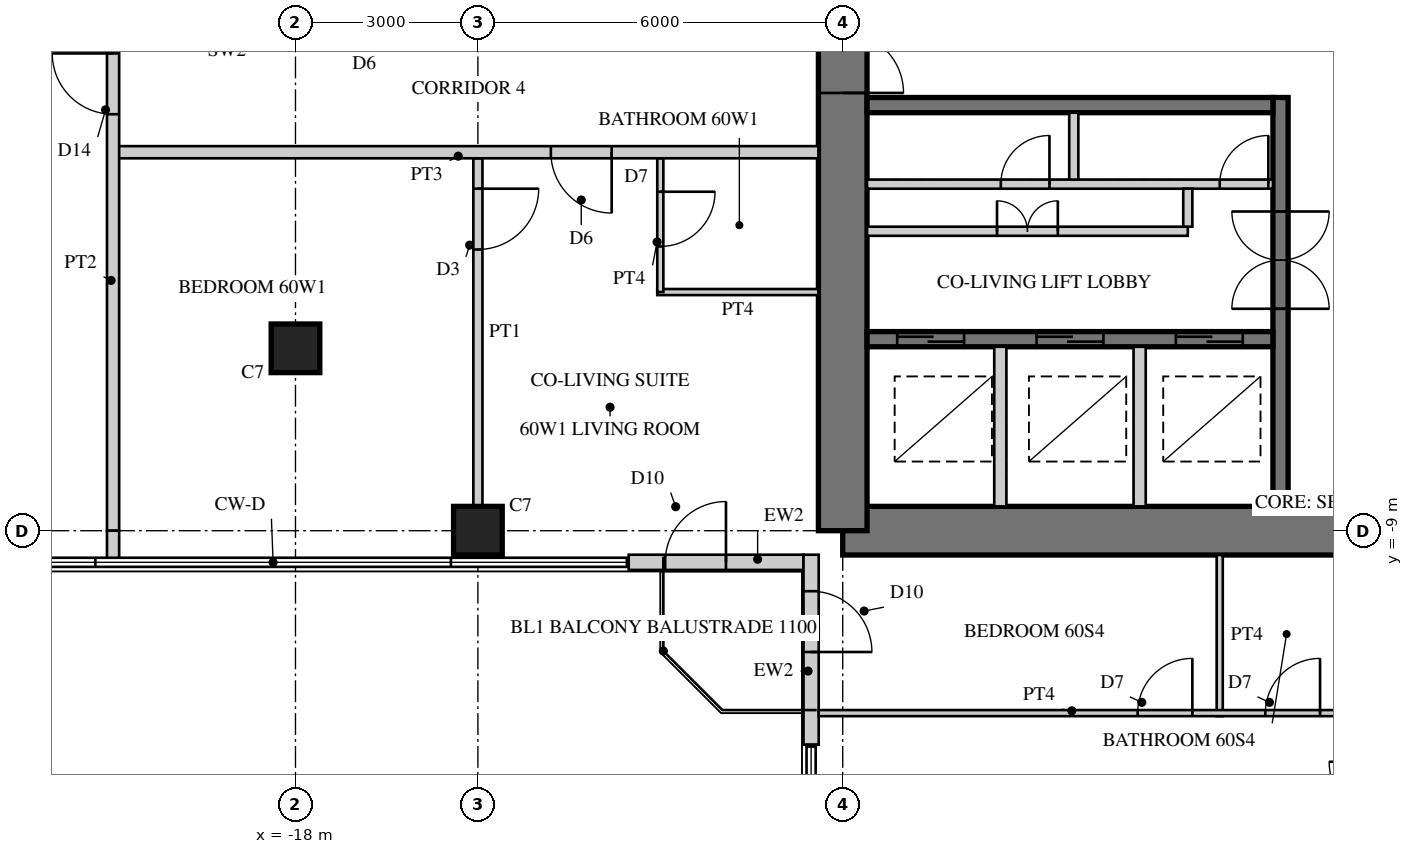
"""IFC4 building model, lengths in metres.
Left out: names, types, materials, properties, quantities, classifications, styles, units other than length and angle.
Written with IfcOpenShell. Run it as: python <this file> out.ifc"""

import sys

from ifc_helpers import new_model, si_unit, direction, frame, frame_2d, origin, origin_2d, place, context, subcontext, project, spatial, rectangle, hollow_rectangle, extrude, element, fill, save


model = new_model("IFC4")
c1 = context("Model", 3, precision=1e-05, world=origin(), true_north=direction((0.0, 1.0)))
c2 = subcontext(c1, "Body", "Model", "MODEL_VIEW")
j1 = project(units=[si_unit("LENGTHUNIT", "METRE"), si_unit("PLANEANGLEUNIT", "RADIAN")], contexts=[c1])
p1 = place(None, origin())
s1 = spatial("IfcSite", under=j1, at=p1, CompositionType="ELEMENT")
p2 = place(p1, origin())
s2 = spatial("IfcBuilding", under=s1, at=p2, CompositionType="ELEMENT")
p3 = place(p2, frame((0.0, 0.0, 235.7)))
s3 = spatial("IfcBuildingStorey", under=s2, at=p3, CompositionType="ELEMENT", Elevation=235.7)
p4 = place(p3, frame((-9.0, -9.0, 0.0), z_axis=(0.0, 0.0, 1.0), x_axis=(1.0, 0.0, 0.0)))
e1 = element("IfcWall", 1, at=p4, inside=s3, PredefinedType="SHEAR", context=c2, shape_type="SweptSolid", body=[
    extrude(rectangle(XDim=18.0, YDim=0.8, at=frame_2d((9.0, 0.0))), origin(), (0.0, 0.0, 1.0), 3.4),
])
p5 = place(p4, frame((9.8, 0.0, 0.0)))
e2 = element("IfcOpeningElement", 2, at=p5, cuts=e1, PredefinedType="OPENING", context=c2, shape_type="SweptSolid", body=[
    extrude(rectangle(XDim=1.0, YDim=2.4, at=frame_2d((0.5, 1.2))), frame((0.0, 0.41, 0.0), z_axis=(0.0, -1.0, 0.0), x_axis=(1.0, 0.0, 0.0)), (0.0, 0.0, 1.0), 0.82),
])
p6 = place(p3, frame((-9.0, 9.0, 0.0), z_axis=(0.0, 0.0, 1.0), x_axis=(0.0, -1.0, 0.0)))
e3 = element("IfcWall", 3, at=p6, inside=s3, PredefinedType="SHEAR", context=c2, shape_type="SweptSolid", body=[
    extrude(rectangle(XDim=18.0, YDim=0.8, at=frame_2d((9.0, 0.0))), origin(), (0.0, 0.0, 1.0), 3.4),
])
p7 = place(p6, frame((9.8, 0.0, 0.0)))
e4 = element("IfcOpeningElement", 4, at=p7, cuts=e3, PredefinedType="OPENING", context=c2, shape_type="SweptSolid", body=[
    extrude(rectangle(XDim=1.0, YDim=2.4, at=frame_2d((0.5, 1.2))), frame((0.0, 0.41, 0.0), z_axis=(0.0, -1.0, 0.0), x_axis=(1.0, 0.0, 0.0)), (0.0, 0.0, 1.0), 0.82),
])
p8 = place(p3, frame((-1.8, -1.875, 0.0), z_axis=(0.0, 0.0, 1.0), x_axis=(0.0, -1.0, 0.0)))
e5 = element("IfcWall", 5, at=p8, inside=s3, PredefinedType="SHEAR", context=c2, shape_type="SweptSolid", body=[
    extrude(rectangle(XDim=6.725, YDim=0.25, at=frame_2d((3.363, 0.0))), origin(), (0.0, 0.0, 1.0), 3.4),
])
p9 = place(p8, frame((1.875, 0.0, 0.0)))
e6 = element("IfcOpeningElement", 6, at=p9, cuts=e5, PredefinedType="OPENING", context=c2, shape_type="SweptSolid", body=[
    extrude(rectangle(XDim=1.6, YDim=2.4, at=frame_2d((0.8, 1.2))), frame((0.0, 0.135, 0.0), z_axis=(0.0, -1.0, 0.0), x_axis=(1.0, 0.0, 0.0)), (0.0, 0.0, 1.0), 0.27),
])
p10 = place(p3, frame((-1.925, -2.0, 0.0), z_axis=(0.0, 0.0, 1.0), x_axis=(-1.0, 0.0, 0.0)))
e7 = element("IfcWall", 7, at=p10, inside=s3, PredefinedType="SHEAR", context=c2, shape_type="SweptSolid", body=[
    extrude(rectangle(XDim=6.675, YDim=0.25, at=frame_2d((3.337, 0.0))), origin(), (0.0, 0.0, 1.0), 3.4),
])
p11 = place(p3, frame((-1.925, -5.85, 0.0), z_axis=(0.0, 0.0, 1.0), x_axis=(-1.0, 0.0, 0.0)))
e8 = element("IfcWall", 8, at=p11, inside=s3, PredefinedType="SHEAR", context=c2, shape_type="SweptSolid", body=[
    extrude(rectangle(XDim=6.675, YDim=0.25, at=frame_2d((3.337, 0.0))), origin(), (0.0, 0.0, 1.0), 3.4),
])
p12 = place(p11, frame((0.496, 0.0, 0.0)))
e9 = element("IfcOpeningElement", 9, at=p12, cuts=e8, PredefinedType="OPENING", context=c2, shape_type="SweptSolid", body=[
    extrude(rectangle(XDim=1.1, YDim=2.2, at=frame_2d((0.55, 1.1))), frame((0.0, 0.135, 0.0), z_axis=(0.0, -1.0, 0.0), x_axis=(1.0, 0.0, 0.0)), (0.0, 0.0, 1.0), 0.27),
])
p13 = place(p11, frame((2.788, 0.0, 0.0)))
e10 = element("IfcOpeningElement", 10, at=p13, cuts=e8, PredefinedType="OPENING", context=c2, shape_type="SweptSolid", body=[
    extrude(rectangle(XDim=1.1, YDim=2.2, at=frame_2d((0.55, 1.1))), frame((0.0, 0.135, 0.0), z_axis=(0.0, -1.0, 0.0), x_axis=(1.0, 0.0, 0.0)), (0.0, 0.0, 1.0), 0.27),
])
p14 = place(p11, frame((5.079, 0.0, 0.0)))
e11 = element("IfcOpeningElement", 11, at=p14, cuts=e8, PredefinedType="OPENING", context=c2, shape_type="SweptSolid", body=[
    extrude(rectangle(XDim=1.1, YDim=2.2, at=frame_2d((0.55, 1.1))), frame((0.0, 0.135, 0.0), z_axis=(0.0, -1.0, 0.0), x_axis=(1.0, 0.0, 0.0)), (0.0, 0.0, 1.0), 0.27),
])
p15 = place(p3, frame((-1.925, -3.3, 0.0), z_axis=(0.0, 0.0, 1.0), x_axis=(-1.0, 0.0, 0.0)))
e12 = element("IfcWall", 12, at=p15, inside=s3, PredefinedType="PARTITIONING", context=c2, shape_type="SweptSolid", body=[
    extrude(rectangle(XDim=6.675, YDim=0.15, at=frame_2d((3.337, 0.0))), origin(), (0.0, 0.0, 1.0), 3.4),
])
p16 = place(p15, frame((0.075, 0.0, 0.0)))
e13 = element("IfcOpeningElement", 13, at=p16, cuts=e12, PredefinedType="OPENING", context=c2, shape_type="SweptSolid", body=[
    extrude(rectangle(XDim=0.8, YDim=2.1, at=frame_2d((0.4, 1.05))), frame((0.0, 0.085, 0.0), z_axis=(0.0, -1.0, 0.0), x_axis=(1.0, 0.0, 0.0)), (0.0, 0.0, 1.0), 0.17),
])
p17 = place(p15, frame((3.675, 0.0, 0.0)))
e14 = element("IfcOpeningElement", 14, at=p17, cuts=e12, PredefinedType="OPENING", context=c2, shape_type="SweptSolid", body=[
    extrude(rectangle(XDim=0.8, YDim=2.1, at=frame_2d((0.4, 1.05))), frame((0.0, 0.085, 0.0), z_axis=(0.0, -1.0, 0.0), x_axis=(1.0, 0.0, 0.0)), (0.0, 0.0, 1.0), 0.17),
])
p18 = place(p3, frame((-5.2, -2.125, 0.0), z_axis=(0.0, 0.0, 1.0), x_axis=(0.0, -1.0, 0.0)))
e15 = element("IfcWall", 15, at=p18, inside=s3, PredefinedType="PARTITIONING", context=c2, shape_type="SweptSolid", body=[
    extrude(rectangle(XDim=1.1, YDim=0.15, at=frame_2d((0.55, 0.0))), origin(), (0.0, 0.0, 1.0), 3.4),
])
for number, where, z_axis, x_axis in (
    (16, (-4.117, -5.975, 0.0), (0.0, 0.0, 1.0), (0.0, -1.0, 0.0)),
    (17, (-6.408, -5.975, 0.0), (0.0, 0.0, 1.0), (0.0, -1.0, 0.0)),
):
    element("IfcWall", number, at=place(p3, frame(where, z_axis=z_axis, x_axis=x_axis)), inside=s3, PredefinedType="PARTITIONING", context=c2, shape_type="SweptSolid", body=[
        extrude(rectangle(XDim=2.625, YDim=0.2, at=frame_2d((1.312, 0.0))), origin(), (0.0, 0.0, 1.0), 3.4),
    ])
for number, where, z_axis, x_axis in (
    (18, (-15.0, -9.0, 0.0), (0.0, 0.0, 1.0), (1.0, 0.0, 0.0)),
    (19, (-18.0, -6.0, 0.0), (0.0, 0.0, 1.0), (1.0, 0.0, 0.0)),
):
    element("IfcColumn", number, at=place(p3, frame(where, z_axis=z_axis, x_axis=x_axis)), inside=s3, PredefinedType="COLUMN", context=c2, shape_type="SweptSolid", body=[
        extrude(rectangle(XDim=0.8, YDim=0.8, at=origin_2d()), origin(), (0.0, 0.0, 1.0), 3.4),
    ])
p19 = place(p3, frame((-12.52, -9.52, 0.0), z_axis=(0.0, 0.0, 1.0), x_axis=(1.0, 0.0, 0.0)))
e20 = element("IfcWall", 20, at=p19, inside=s3, PredefinedType="SOLIDWALL", context=c2, shape_type="SweptSolid", body=[
    extrude(rectangle(XDim=2.875, YDim=0.25, at=frame_2d((1.438, 0.0))), origin(), (0.0, 0.0, 1.0), 3.22),
])
p20 = place(p19, frame((0.6, 0.0, 0.0)))
e21 = element("IfcOpeningElement", 21, at=p20, cuts=e20, PredefinedType="OPENING", context=c2, shape_type="SweptSolid", body=[
    extrude(rectangle(XDim=1.0, YDim=2.2, at=frame_2d((0.5, 1.1))), frame((0.0, 0.135, 0.0), z_axis=(0.0, -1.0, 0.0), x_axis=(1.0, 0.0, 0.0)), (0.0, 0.0, 1.0), 0.27),
])
p21 = place(p3, frame((-9.52, -9.395, 0.0), z_axis=(0.0, 0.0, 1.0), x_axis=(0.0, -1.0, 0.0)))
e22 = element("IfcWall", 22, at=p21, inside=s3, PredefinedType="SOLIDWALL", context=c2, shape_type="SweptSolid", body=[
    extrude(rectangle(XDim=3.125, YDim=0.25, at=frame_2d((1.562, 0.0))), origin(), (0.0, 0.0, 1.0), 3.22),
])
p22 = place(p21, frame((0.6, 0.0, 0.0)))
e23 = element("IfcOpeningElement", 23, at=p22, cuts=e22, PredefinedType="OPENING", context=c2, shape_type="SweptSolid", body=[
    extrude(rectangle(XDim=1.0, YDim=2.2, at=frame_2d((0.5, 1.1))), frame((0.0, 0.135, 0.0), z_axis=(0.0, -1.0, 0.0), x_axis=(1.0, 0.0, 0.0)), (0.0, 0.0, 1.0), 0.27),
])
p23 = place(p3, frame((-3.325, -4.075, 0.0), z_axis=(0.0, 0.0, 1.0), x_axis=(-1.0, 0.0, 0.0)))
e24 = element("IfcWall", 24, at=p23, inside=s3, PredefinedType="PARTITIONING", context=c2, shape_type="SweptSolid", body=[
    extrude(rectangle(XDim=5.275, YDim=0.15, at=frame_2d((2.638, 0.0))), origin(), (0.0, 0.0, 1.0), 3.22),
])
p24 = place(p23, frame((2.137, 0.0, 0.0)))
e25 = element("IfcOpeningElement", 25, at=p24, cuts=e24, PredefinedType="OPENING", context=c2, shape_type="SweptSolid", body=[
    extrude(rectangle(XDim=1.0, YDim=2.1, at=frame_2d((0.5, 1.05))), frame((0.0, 0.085, 0.0), z_axis=(0.0, -1.0, 0.0), x_axis=(1.0, 0.0, 0.0)), (0.0, 0.0, 1.0), 0.17),
])
p25 = place(p3, frame((-3.325, -3.375, 0.0), z_axis=(0.0, 0.0, 1.0), x_axis=(0.0, -1.0, 0.0)))
e26 = element("IfcWall", 26, at=p25, inside=s3, PredefinedType="PARTITIONING", context=c2, shape_type="SweptSolid", body=[
    extrude(rectangle(XDim=0.625, YDim=0.15, at=frame_2d((0.312, 0.0))), origin(), (0.0, 0.0, 1.0), 3.22),
])
p26 = place(p3, frame((-2.8, -9.4, 0.0), z_axis=(0.0, 0.0, 1.0), x_axis=(0.0, -1.0, 0.0)))
e27 = element("IfcWall", 27, at=p26, inside=s3, PredefinedType="PARTITIONING", context=c2, shape_type="SweptSolid", body=[
    extrude(rectangle(XDim=2.65, YDim=0.1, at=frame_2d((1.325, 0.0))), origin(), (0.0, 0.0, 1.0), 3.22),
])
p27 = place(p3, frame((-9.395, -12.0, 0.0), z_axis=(0.0, 0.0, 1.0), x_axis=(1.0, 0.0, 0.0)))
e28 = element("IfcWall", 28, at=p27, inside=s3, PredefinedType="PARTITIONING", context=c2, shape_type="SweptSolid", body=[
    extrude(rectangle(XDim=8.795, YDim=0.1, at=frame_2d((4.397, 0.0))), origin(), (0.0, 0.0, 1.0), 3.22),
])
p28 = place(p27, frame((5.245, 0.0, 0.0)))
e29 = element("IfcOpeningElement", 29, at=p28, cuts=e28, PredefinedType="OPENING", context=c2, shape_type="SweptSolid", body=[
    extrude(rectangle(XDim=0.9, YDim=2.1, at=frame_2d((0.45, 1.05))), frame((0.0, 0.06, 0.0), z_axis=(0.0, -1.0, 0.0), x_axis=(1.0, 0.0, 0.0)), (0.0, 0.0, 1.0), 0.12),
])
p29 = place(p27, frame((7.345, 0.0, 0.0)))
e30 = element("IfcOpeningElement", 30, at=p29, cuts=e28, PredefinedType="OPENING", context=c2, shape_type="SweptSolid", body=[
    extrude(rectangle(XDim=0.9, YDim=2.1, at=frame_2d((0.45, 1.05))), frame((0.0, 0.06, 0.0), z_axis=(0.0, -1.0, 0.0), x_axis=(1.0, 0.0, 0.0)), (0.0, 0.0, 1.0), 0.12),
])
p30 = place(p3, frame((-9.4, -5.075, 0.0), z_axis=(0.0, 0.0, 1.0), x_axis=(-1.0, 0.0, 0.0)))
e31 = element("IfcWall", 31, at=p30, inside=s3, PredefinedType="PARTITIONING", context=c2, shape_type="SweptSolid", body=[
    extrude(rectangle(XDim=2.65, YDim=0.1, at=frame_2d((1.325, 0.0))), origin(), (0.0, 0.0, 1.0), 3.22),
])
p31 = place(p3, frame((-12.0, -2.875, 0.0), z_axis=(0.0, 0.0, 1.0), x_axis=(0.0, -1.0, 0.0)))
e32 = element("IfcWall", 32, at=p31, inside=s3, PredefinedType="PARTITIONING", context=c2, shape_type="SweptSolid", body=[
    extrude(rectangle(XDim=2.2, YDim=0.1, at=frame_2d((1.1, 0.0))), origin(), (0.0, 0.0, 1.0), 3.22),
])
p32 = place(p31, frame((0.55, 0.0, 0.0)))
e33 = element("IfcOpeningElement", 33, at=p32, cuts=e32, PredefinedType="OPENING", context=c2, shape_type="SweptSolid", body=[
    extrude(rectangle(XDim=0.9, YDim=2.1, at=frame_2d((0.45, 1.05))), frame((0.0, 0.06, 0.0), z_axis=(0.0, -1.0, 0.0), x_axis=(1.0, 0.0, 0.0)), (0.0, 0.0, 1.0), 0.12),
])
p33 = place(p3, frame((-15.0, -2.875, 0.0), z_axis=(0.0, 0.0, 1.0), x_axis=(0.0, -1.0, 0.0)))
e34 = element("IfcWall", 34, at=p33, inside=s3, PredefinedType="PARTITIONING", context=c2, shape_type="SweptSolid", body=[
    extrude(rectangle(XDim=5.725, YDim=0.15, at=frame_2d((2.863, 0.0))), origin(), (0.0, 0.0, 1.0), 2.52),
])
p34 = place(p33, frame((0.5, 0.0, 0.0)))
e35 = element("IfcOpeningElement", 35, at=p34, cuts=e34, PredefinedType="OPENING", context=c2, shape_type="SweptSolid", body=[
    extrude(rectangle(XDim=1.0, YDim=2.1, at=frame_2d((0.5, 1.05))), frame((0.0, 0.085, 0.0), z_axis=(0.0, -1.0, 0.0), x_axis=(1.0, 0.0, 0.0)), (0.0, 0.0, 1.0), 0.17),
])
p35 = place(p3, frame((-9.4, -2.775, 0.0), z_axis=(0.0, 0.0, 1.0), x_axis=(-1.0, 0.0, 0.0)))
e36 = element("IfcWall", 36, at=p35, inside=s3, PredefinedType="SOLIDWALL", context=c2, shape_type="SweptSolid", body=[
    extrude(rectangle(XDim=11.6, YDim=0.2, at=frame_2d((5.8, 0.0))), origin(), (0.0, 0.0, 1.0), 3.22),
])
p36 = place(p35, frame((3.4, 0.0, 0.0)))
e37 = element("IfcOpeningElement", 37, at=p36, cuts=e36, PredefinedType="OPENING", context=c2, shape_type="SweptSolid", body=[
    extrude(rectangle(XDim=1.0, YDim=2.15, at=frame_2d((0.5, 1.075))), frame((0.0, 0.11, 0.0), z_axis=(0.0, -1.0, 0.0), x_axis=(1.0, 0.0, 0.0)), (0.0, 0.0, 1.0), 0.22),
])
p37 = place(p3, frame((-21.0, -0.8, 0.0), z_axis=(0.0, 0.0, 1.0), x_axis=(0.0, -1.0, 0.0)))
e38 = element("IfcWall", 38, at=p37, inside=s3, PredefinedType="SOLIDWALL", context=c2, shape_type="SweptSolid", body=[
    extrude(rectangle(XDim=8.2, YDim=0.2, at=frame_2d((4.1, 0.0))), origin(), (0.0, 0.0, 1.0), 2.67),
])
p38 = place(p37, frame((0.35, 0.0, 0.0)))
e39 = element("IfcOpeningElement", 39, at=p38, cuts=e38, PredefinedType="OPENING", context=c2, shape_type="SweptSolid", body=[
    extrude(rectangle(XDim=1.0, YDim=2.2, at=frame_2d((0.5, 1.1))), frame((0.0, 0.11, 0.0), z_axis=(0.0, -1.0, 0.0), x_axis=(1.0, 0.0, 0.0)), (0.0, 0.0, 1.0), 0.22),
])
p39 = place(p3, frame((-21.0, -9.0, 0.0), z_axis=(0.0, 0.0, 1.0), x_axis=(0.0, -1.0, 0.0)))
e40 = element("IfcWall", 40, at=p39, inside=s3, PredefinedType="SOLIDWALL", context=c2, shape_type="SweptSolid", body=[
    extrude(rectangle(XDim=0.48, YDim=0.2, at=frame_2d((0.24, 0.0))), origin(), (0.0, 0.0, 1.0), 3.22),
])
p40 = place(p20, origin())
e41 = element("IfcDoor", 41, at=p40, inside=s3, OperationType="SINGLE_SWING_RIGHT", PredefinedType="DOOR", context=c2, shape_type="SweptSolid", body=[
    extrude(hollow_rectangle(XDim=1.0, YDim=2.2, WallThickness=0.06, at=frame_2d((0.5, 1.1))), frame((0.0, 0.025, 0.0), z_axis=(0.0, -1.0, 0.0), x_axis=(1.0, 0.0, 0.0)), (0.0, 0.0, 1.0), 0.05),
    extrude(rectangle(XDim=0.879, YDim=2.079, at=frame_2d((0.5, 1.1))), frame((0.0, 0.025, 0.0), z_axis=(0.0, -1.0, 0.0), x_axis=(1.0, 0.0, 0.0)), (0.0, 0.0, 1.0), 0.05),
])
fill(e21, e41)
p41 = place(p22, origin())
e42 = element("IfcDoor", 42, at=p41, inside=s3, OperationType="SINGLE_SWING_RIGHT", PredefinedType="DOOR", context=c2, shape_type="SweptSolid", body=[
    extrude(hollow_rectangle(XDim=1.0, YDim=2.2, WallThickness=0.06, at=frame_2d((0.5, 1.1))), frame((0.0, 0.025, 0.0), z_axis=(0.0, -1.0, 0.0), x_axis=(1.0, 0.0, 0.0)), (0.0, 0.0, 1.0), 0.05),
    extrude(rectangle(XDim=0.879, YDim=2.079, at=frame_2d((0.5, 1.1))), frame((0.0, 0.025, 0.0), z_axis=(0.0, -1.0, 0.0), x_axis=(1.0, 0.0, 0.0)), (0.0, 0.0, 1.0), 0.05),
])
fill(e23, e42)
p42 = place(p24, frame((1.0, 0.0, 0.0), z_axis=(0.0, 0.0, 1.0), x_axis=(-1.0, 0.0, 0.0)))
e43 = element("IfcDoor", 43, at=p42, inside=s3, OperationType="DOUBLE_DOOR_SINGLE_SWING", PredefinedType="DOOR", context=c2, shape_type="SweptSolid", body=[
    extrude(rectangle(XDim=1.0, YDim=2.1, at=frame_2d((0.5, 1.05))), frame((0.0, 0.025, 0.0), z_axis=(0.0, -1.0, 0.0), x_axis=(1.0, 0.0, 0.0)), (0.0, 0.0, 1.0), 0.05),
])
fill(e25, e43)
p43 = place(p28, origin())
e44 = element("IfcDoor", 44, at=p43, inside=s3, OperationType="SINGLE_SWING_RIGHT", PredefinedType="DOOR", context=c2, shape_type="SweptSolid", body=[
    extrude(rectangle(XDim=0.9, YDim=2.1, at=frame_2d((0.45, 1.05))), frame((0.0, 0.025, 0.0), z_axis=(0.0, -1.0, 0.0), x_axis=(1.0, 0.0, 0.0)), (0.0, 0.0, 1.0), 0.05),
])
fill(e29, e44)
p44 = place(p29, origin())
e45 = element("IfcDoor", 45, at=p44, inside=s3, OperationType="SINGLE_SWING_RIGHT", PredefinedType="DOOR", context=c2, shape_type="SweptSolid", body=[
    extrude(rectangle(XDim=0.9, YDim=2.1, at=frame_2d((0.45, 1.05))), frame((0.0, 0.025, 0.0), z_axis=(0.0, -1.0, 0.0), x_axis=(1.0, 0.0, 0.0)), (0.0, 0.0, 1.0), 0.05),
])
fill(e30, e45)
p45 = place(p32, origin())
e46 = element("IfcDoor", 46, at=p45, inside=s3, OperationType="SINGLE_SWING_LEFT", PredefinedType="DOOR", context=c2, shape_type="SweptSolid", body=[
    extrude(rectangle(XDim=0.9, YDim=2.1, at=frame_2d((0.45, 1.05))), frame((0.0, 0.025, 0.0), z_axis=(0.0, -1.0, 0.0), x_axis=(1.0, 0.0, 0.0)), (0.0, 0.0, 1.0), 0.05),
])
fill(e33, e46)
p46 = place(p34, origin())
e47 = element("IfcDoor", 47, at=p46, inside=s3, OperationType="SINGLE_SWING_LEFT", PredefinedType="DOOR", context=c2, shape_type="SweptSolid", body=[
    extrude(rectangle(XDim=1.0, YDim=2.1, at=frame_2d((0.5, 1.05))), frame((0.0, 0.025, 0.0), z_axis=(0.0, -1.0, 0.0), x_axis=(1.0, 0.0, 0.0)), (0.0, 0.0, 1.0), 0.05),
])
fill(e35, e47)
p47 = place(p36, origin())
e48 = element("IfcDoor", 48, at=p47, inside=s3, OperationType="SINGLE_SWING_LEFT", PredefinedType="DOOR", context=c2, shape_type="SweptSolid", body=[
    extrude(rectangle(XDim=1.0, YDim=2.15, at=frame_2d((0.5, 1.075))), frame((0.0, 0.025, 0.0), z_axis=(0.0, -1.0, 0.0), x_axis=(1.0, 0.0, 0.0)), (0.0, 0.0, 1.0), 0.05),
])
fill(e37, e48)
p48 = place(p38, frame((1.0, 0.0, 0.0), z_axis=(0.0, 0.0, 1.0), x_axis=(-1.0, 0.0, 0.0)))
e49 = element("IfcDoor", 49, at=p48, inside=s3, OperationType="SINGLE_SWING_RIGHT", PredefinedType="DOOR", context=c2, shape_type="SweptSolid", body=[
    extrude(rectangle(XDim=1.0, YDim=2.2, at=frame_2d((0.5, 1.1))), frame((0.0, 0.025, 0.0), z_axis=(0.0, -1.0, 0.0), x_axis=(1.0, 0.0, 0.0)), (0.0, 0.0, 1.0), 0.05),
])
fill(e39, e49)
p49 = place(p7, origin())
e50 = element("IfcDoor", 50, at=p49, inside=s3, OperationType="SINGLE_SWING_RIGHT", PredefinedType="DOOR", context=c2, shape_type="SweptSolid", body=[
    extrude(rectangle(XDim=1.0, YDim=2.4, at=frame_2d((0.5, 1.2))), frame((0.0, 0.055, 0.0), z_axis=(0.0, -1.0, 0.0), x_axis=(1.0, 0.0, 0.0)), (0.0, 0.0, 1.0), 0.05),
])
fill(e4, e50)
p50 = place(p12, origin())
e51 = element("IfcDoor", 51, at=p50, inside=s3, OperationType="DOUBLE_DOOR_SLIDING", PredefinedType="DOOR", context=c2, shape_type="SweptSolid", body=[
    extrude(rectangle(XDim=1.1, YDim=2.2, at=frame_2d((0.55, 1.1))), frame((0.0, 0.025, 0.0), z_axis=(0.0, -1.0, 0.0), x_axis=(1.0, 0.0, 0.0)), (0.0, 0.0, 1.0), 0.05),
])
fill(e9, e51)
p51 = place(p13, origin())
e52 = element("IfcDoor", 52, at=p51, inside=s3, OperationType="DOUBLE_DOOR_SLIDING", PredefinedType="DOOR", context=c2, shape_type="SweptSolid", body=[
    extrude(rectangle(XDim=1.1, YDim=2.2, at=frame_2d((0.55, 1.1))), frame((0.0, 0.025, 0.0), z_axis=(0.0, -1.0, 0.0), x_axis=(1.0, 0.0, 0.0)), (0.0, 0.0, 1.0), 0.05),
])
fill(e10, e52)
p52 = place(p14, origin())
e53 = element("IfcDoor", 53, at=p52, inside=s3, OperationType="DOUBLE_DOOR_SLIDING", PredefinedType="DOOR", context=c2, shape_type="SweptSolid", body=[
    extrude(rectangle(XDim=1.1, YDim=2.2, at=frame_2d((0.55, 1.1))), frame((0.0, 0.025, 0.0), z_axis=(0.0, -1.0, 0.0), x_axis=(1.0, 0.0, 0.0)), (0.0, 0.0, 1.0), 0.05),
])
fill(e11, e53)
p53 = place(p9, origin())
e54 = element("IfcDoor", 54, at=p53, inside=s3, OperationType="DOUBLE_DOOR_DOUBLE_SWING", PredefinedType="DOOR", context=c2, shape_type="SweptSolid", body=[
    extrude(rectangle(XDim=1.6, YDim=2.4, at=frame_2d((0.8, 1.2))), frame((0.0, 0.025, 0.0), z_axis=(0.0, -1.0, 0.0), x_axis=(1.0, 0.0, 0.0)), (0.0, 0.0, 1.0), 0.05),
])
fill(e6, e54)
p54 = place(p16, frame((0.8, 0.0, 0.0), z_axis=(0.0, 0.0, 1.0), x_axis=(-1.0, 0.0, 0.0)))
e55 = element("IfcDoor", 55, at=p54, inside=s3, OperationType="SINGLE_SWING_RIGHT", PredefinedType="DOOR", context=c2, shape_type="SweptSolid", body=[
    extrude(rectangle(XDim=0.8, YDim=2.1, at=frame_2d((0.4, 1.05))), frame((0.0, 0.025, 0.0), z_axis=(0.0, -1.0, 0.0), x_axis=(1.0, 0.0, 0.0)), (0.0, 0.0, 1.0), 0.05),
])
fill(e13, e55)
p55 = place(p17, frame((0.8, 0.0, 0.0), z_axis=(0.0, 0.0, 1.0), x_axis=(-1.0, 0.0, 0.0)))
e56 = element("IfcDoor", 56, at=p55, inside=s3, OperationType="SINGLE_SWING_RIGHT", PredefinedType="DOOR", context=c2, shape_type="SweptSolid", body=[
    extrude(rectangle(XDim=0.8, YDim=2.1, at=frame_2d((0.4, 1.05))), frame((0.0, 0.025, 0.0), z_axis=(0.0, -1.0, 0.0), x_axis=(1.0, 0.0, 0.0)), (0.0, 0.0, 1.0), 0.05),
])
fill(e14, e56)
save(model, sys.argv[1])
